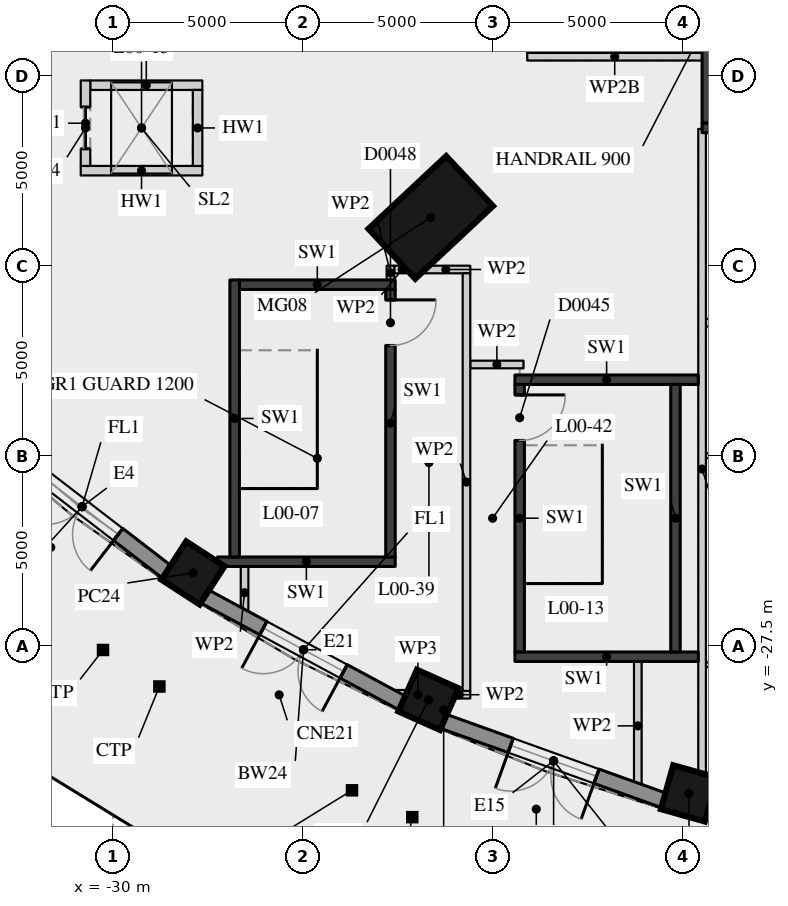
"""IFC4 building model, lengths in metres.
Left out: names, types, materials, properties, quantities, classifications, styles, units other than length and angle.
Written with IfcOpenShell. Run it as: python <this file> out.ifc"""

import sys

from ifc_helpers import new_model, si_unit, direction, frame, frame_2d, origin, origin_2d, place, context, subcontext, project, spatial, rectangle, hollow_circle, extrude, element, fill, save


model = new_model("IFC4")
c1 = context("Model", 3, precision=1e-05, world=origin(), true_north=direction((0.0, 1.0)))
c2 = subcontext(c1, "Body", "Model", "MODEL_VIEW")
j1 = project(units=[si_unit("LENGTHUNIT", "METRE"), si_unit("PLANEANGLEUNIT", "RADIAN")], contexts=[c1])
p1 = place(None, origin())
s1 = spatial("IfcSite", under=j1, at=p1, CompositionType="ELEMENT")
p2 = place(p1, origin())
s2 = spatial("IfcBuilding", under=s1, at=p2, CompositionType="ELEMENT")
p3 = place(p2, origin())
s3 = spatial("IfcBuildingStorey", under=s2, at=p3, CompositionType="ELEMENT", Elevation=0.0)
p4 = place(p3, frame((-21.641, -16.23, 0.0), z_axis=(0.0, 0.0, 1.0), x_axis=(-0.730113022917, -0.683326403535, 0.0)))
e1 = element("IfcColumn", 1, at=p4, inside=s3, PredefinedType="COLUMN", context=c2, shape_type="SweptSolid", body=[
    extrude(rectangle(XDim=2.8, YDim=1.8, at=origin_2d()), origin(), (0.0, 0.0, 1.0), 7.5),
])
for number, where, z_axis, x_axis in (
    (2, (-27.897, -25.586, 0.0), (0.0, 0.0, 1.0), (-0.544, -0.839, 0.0)),
    (3, (-21.7, -28.925, 0.0), (0.0, 0.0, 1.0), (-0.407, -0.913, 0.0)),
    (4, (-14.844, -31.386, 0.0), (0.0, 0.0, 1.0), (-0.271, -0.963, 0.0)),
):
    element("IfcColumn", number, at=place(p3, frame(where, z_axis=z_axis, x_axis=x_axis)), inside=s3, PredefinedType="COLUMN", context=c2, shape_type="SweptSolid", body=[
        extrude(rectangle(XDim=1.2, YDim=1.2, at=origin_2d()), origin(), (0.0, 0.0, 1.0), 7.5),
    ])
p5 = place(p3, frame((-33.063, -22.112, 0.0), z_axis=(0.0, 0.0, 1.0), x_axis=(0.79246558555, -0.609916630138, 0.0)))
e5 = element("IfcWall", 5, at=p5, inside=s3, PredefinedType="SOLIDWALL", context=c2, shape_type="SweptSolid", body=[
    extrude(rectangle(XDim=5.673, YDim=0.4, at=frame_2d((2.837, 0.0))), origin(), (0.0, 0.0, 1.0), 6.19),
])
p6 = place(p5, frame((1.636, 0.0, 0.0)))
e6 = element("IfcOpeningElement", 6, at=p6, cuts=e5, PredefinedType="OPENING", context=c2, shape_type="SweptSolid", body=[
    extrude(rectangle(XDim=2.4, YDim=2.2, at=frame_2d((1.2, 1.1))), frame((0.0, 0.21, 0.0), z_axis=(0.0, -1.0, 0.0), x_axis=(1.0, 0.0, 0.0)), (0.0, 0.0, 1.0), 0.42),
])
p7 = place(p5, frame((1.636, 0.0, 2.6)))
e7 = element("IfcOpeningElement", 7, at=p7, cuts=e5, PredefinedType="OPENING", context=c2, shape_type="SweptSolid", body=[
    extrude(rectangle(XDim=2.4, YDim=3.49, at=frame_2d((1.2, 1.745))), frame((0.0, 0.21, 0.0), z_axis=(0.0, -1.0, 0.0), x_axis=(1.0, 0.0, 0.0)), (0.0, 0.0, 1.0), 0.42),
])
p8 = place(p3, frame((-30.264, -27.612, -0.2), z_axis=(0.0, 0.0, 1.0), x_axis=(1.0, 0.0, 0.0)))
e8 = element("IfcColumn", 8, at=p8, inside=s3, PredefinedType="COLUMN", context=c2, shape_type="SweptSolid", body=[
    extrude(hollow_circle(Radius=0.084, WallThickness=0.008, at=origin_2d()), origin(), (0.0, 0.0, 1.0), 4.755),
])
p9 = place(p3, frame((-27.611, -26.192, 0.0), z_axis=(0.0, 0.0, 1.0), x_axis=(0.880313157301, -0.474393028072, 0.0)))
e9 = element("IfcWall", 9, at=p9, inside=s3, PredefinedType="SOLIDWALL", context=c2, shape_type="SweptSolid", body=[
    extrude(rectangle(XDim=5.958, YDim=0.4, at=frame_2d((2.979, 0.0))), origin(), (0.0, 0.0, 1.0), 6.19),
])
p10 = place(p9, frame((1.779, 0.0, 0.0)))
e10 = element("IfcOpeningElement", 10, at=p10, cuts=e9, PredefinedType="OPENING", context=c2, shape_type="SweptSolid", body=[
    extrude(rectangle(XDim=2.4, YDim=2.2, at=frame_2d((1.2, 1.1))), frame((0.0, 0.21, 0.0), z_axis=(0.0, -1.0, 0.0), x_axis=(1.0, 0.0, 0.0)), (0.0, 0.0, 1.0), 0.42),
])
p11 = place(p9, frame((1.779, 0.0, 2.6)))
e11 = element("IfcOpeningElement", 11, at=p11, cuts=e9, PredefinedType="OPENING", context=c2, shape_type="SweptSolid", body=[
    extrude(rectangle(XDim=2.4, YDim=3.49, at=frame_2d((1.2, 1.745))), frame((0.0, 0.21, 0.0), z_axis=(0.0, -1.0, 0.0), x_axis=(1.0, 0.0, 0.0)), (0.0, 0.0, 1.0), 0.42),
])
for number, where, z_axis, x_axis in (
    (12, (-28.781, -28.573, -0.2), (0.0, 0.0, 1.0), (1.0, 0.0, 0.0)),
    (13, (-23.712, -31.305, -0.2), (0.0, 0.0, 1.0), (1.0, 0.0, 0.0)),
):
    element("IfcColumn", number, at=place(p3, frame(where, z_axis=z_axis, x_axis=x_axis)), inside=s3, PredefinedType="COLUMN", context=c2, shape_type="SweptSolid", body=[
        extrude(hollow_circle(Radius=0.084, WallThickness=0.008, at=origin_2d()), origin(), (0.0, 0.0, 1.0), 4.755),
    ])
p12 = place(p3, frame((-21.325, -29.483, 0.0), z_axis=(0.0, 0.0, 1.0), x_axis=(0.941225814421, -0.337777983694, 0.0)))
e14 = element("IfcWall", 14, at=p12, inside=s3, PredefinedType="SOLIDWALL", context=c2, shape_type="SweptSolid", body=[
    extrude(rectangle(XDim=6.199, YDim=0.4, at=frame_2d((3.1, 0.0))), origin(), (0.0, 0.0, 1.0), 6.19),
])
p13 = place(p12, frame((1.9, 0.0, 0.0)))
e15 = element("IfcOpeningElement", 15, at=p13, cuts=e14, PredefinedType="OPENING", context=c2, shape_type="SweptSolid", body=[
    extrude(rectangle(XDim=2.4, YDim=2.2, at=frame_2d((1.2, 1.1))), frame((0.0, 0.21, 0.0), z_axis=(0.0, -1.0, 0.0), x_axis=(1.0, 0.0, 0.0)), (0.0, 0.0, 1.0), 0.42),
])
p14 = place(p12, frame((1.9, 0.0, 2.6)))
e16 = element("IfcOpeningElement", 16, at=p14, cuts=e14, PredefinedType="OPENING", context=c2, shape_type="SweptSolid", body=[
    extrude(rectangle(XDim=2.4, YDim=3.49, at=frame_2d((1.2, 1.745))), frame((0.0, 0.21, 0.0), z_axis=(0.0, -1.0, 0.0), x_axis=(1.0, 0.0, 0.0)), (0.0, 0.0, 1.0), 0.42),
])
p15 = place(p3, frame((-22.126, -32.012, -0.2), z_axis=(0.0, 0.0, 1.0), x_axis=(1.0, 0.0, 0.0)))
e17 = element("IfcColumn", 17, at=p15, inside=s3, PredefinedType="COLUMN", context=c2, shape_type="SweptSolid", body=[
    extrude(hollow_circle(Radius=0.084, WallThickness=0.008, at=origin_2d()), origin(), (0.0, 0.0, 1.0), 4.755),
])
p16 = place(p3, frame((-14.375, -13.75, 0.0), z_axis=(0.0, 0.0, 1.0), x_axis=(0.0, 1.0, 0.0)))
e18 = element("IfcWall", 18, at=p16, inside=s3, PredefinedType="SHEAR", context=c2, shape_type="SweptSolid", body=[
    extrude(rectangle(XDim=6.0, YDim=0.25, at=frame_2d((3.0, 0.0))), origin(), (0.0, 0.0, 1.0), 7.09),
])
p17 = place(p3, frame((-14.5, -13.875, 0.0), z_axis=(0.0, 0.0, 1.0), x_axis=(1.0, 0.0, 0.0)))
e19 = element("IfcWall", 19, at=p17, inside=s3, PredefinedType="SHEAR", context=c2, shape_type="SweptSolid", body=[
    extrude(rectangle(XDim=5.2, YDim=0.25, at=frame_2d((2.6, 0.0))), origin(), (0.0, 0.0, 1.0), 7.09),
])
p18 = place(p3, frame((-22.78, -28.79, 0.0), z_axis=(0.0, 0.0, 1.0), x_axis=(1.0, 0.0, 0.0)))
e20 = element("IfcWall", 20, at=p18, inside=s3, PredefinedType="PARTITIONING", context=c2, shape_type="SweptSolid", body=[
    extrude(rectangle(XDim=1.605, YDim=0.25, at=frame_2d((0.803, 0.0))), origin(), (0.0, 0.0, 1.0), 7.09),
])
p19 = place(p3, frame((-21.175, -28.79, 0.0), z_axis=(0.0, 0.0, 1.0), x_axis=(1.0, 0.0, 0.0)))
e21 = element("IfcWall", 21, at=p19, inside=s3, PredefinedType="PARTITIONING", context=c2, shape_type="SweptSolid", body=[
    extrude(rectangle(XDim=0.575, YDim=0.2, at=frame_2d((0.288, 0.0))), origin(), (0.0, 0.0, 1.0), 7.09),
])
p20 = place(p3, frame((-14.4, -28.0, 0.0), z_axis=(0.0, 0.0, 1.0), x_axis=(1.0, 0.0, 0.0)))
e22 = element("IfcWall", 22, at=p20, inside=s3, PredefinedType="PARTITIONING", context=c2, shape_type="SweptSolid", body=[
    extrude(rectangle(XDim=2.9, YDim=0.125, at=frame_2d((1.45, 0.0))), origin(), (0.0, 0.0, 1.0), 7.09),
])
p21 = place(p3, frame((-19.425, -27.79, 0.0), z_axis=(0.0, 0.0, 1.0), x_axis=(1.0, 0.0, 0.0)))
e23 = element("IfcWall", 23, at=p21, inside=s3, PredefinedType="SOLIDWALL", context=c2, shape_type="SweptSolid", body=[
    extrude(rectangle(XDim=4.825, YDim=0.25, at=frame_2d((2.413, 0.0))), origin(), (0.0, 0.0, 1.0), 7.09),
])
p22 = place(p3, frame((-27.25, -25.29, 0.0), z_axis=(0.0, 0.0, 1.0), x_axis=(1.0, 0.0, 0.0)))
e24 = element("IfcWall", 24, at=p22, inside=s3, PredefinedType="SOLIDWALL", context=c2, shape_type="SweptSolid", body=[
    extrude(rectangle(XDim=4.676, YDim=0.25, at=frame_2d((2.338, 0.0))), origin(), (0.0, 0.0, 1.0), 7.09),
])
p23 = place(p3, frame((-14.4, -22.5, 0.0), z_axis=(0.0, 0.0, 1.0), x_axis=(1.0, 0.0, 0.0)))
e25 = element("IfcWall", 25, at=p23, inside=s3, PredefinedType="PARTITIONING", context=c2, shape_type="SweptSolid", body=[
    extrude(rectangle(XDim=2.8, YDim=0.125, at=frame_2d((1.4, 0.0))), origin(), (0.0, 0.0, 1.0), 7.09),
])
p24 = place(p3, frame((-19.425, -20.5, 0.0), z_axis=(0.0, 0.0, 1.0), x_axis=(1.0, 0.0, 0.0)))
e26 = element("IfcWall", 26, at=p24, inside=s3, PredefinedType="SOLIDWALL", context=c2, shape_type="SweptSolid", body=[
    extrude(rectangle(XDim=4.825, YDim=0.25, at=frame_2d((2.413, 0.0))), origin(), (0.0, 0.0, 1.0), 7.09),
])
p25 = place(p3, frame((-20.6, -20.1, 0.0), z_axis=(0.0, 0.0, 1.0), x_axis=(1.0, 0.0, 0.0)))
e27 = element("IfcWall", 27, at=p25, inside=s3, PredefinedType="PARTITIONING", context=c2, shape_type="SweptSolid", body=[
    extrude(rectangle(XDim=1.4, YDim=0.2, at=frame_2d((0.7, 0.0))), origin(), (0.0, 0.0, 1.0), 7.09),
])
p26 = place(p3, frame((-14.4, -19.0, 0.0), z_axis=(0.0, 0.0, 1.0), x_axis=(1.0, 0.0, 0.0)))
e28 = element("IfcWall", 28, at=p26, inside=s3, PredefinedType="PARTITIONING", context=c2, shape_type="SweptSolid", body=[
    extrude(rectangle(XDim=5.0, YDim=0.2, at=frame_2d((2.5, 0.0))), origin(), (0.0, 0.0, 1.0), 7.09),
])
p27 = place(p3, frame((-26.675, -18.0, 0.0), z_axis=(0.0, 0.0, 1.0), x_axis=(1.0, 0.0, 0.0)))
e29 = element("IfcWall", 29, at=p27, inside=s3, PredefinedType="SOLIDWALL", context=c2, shape_type="SweptSolid", body=[
    extrude(rectangle(XDim=4.1, YDim=0.25, at=frame_2d((2.05, 0.0))), origin(), (0.0, 0.0, 1.0), 7.09),
])
p28 = place(p3, frame((-22.6, -17.6, 0.0), z_axis=(0.0, 0.0, 1.0), x_axis=(1.0, 0.0, 0.0)))
e30 = element("IfcWall", 30, at=p28, inside=s3, PredefinedType="PARTITIONING", context=c2, shape_type="SweptSolid", body=[
    extrude(rectangle(XDim=0.42, YDim=0.2, at=frame_2d((0.21, 0.0))), origin(), (0.0, 0.0, 1.0), 7.09),
])
p29 = place(p3, frame((-21.887, -17.6, 0.0), z_axis=(0.0, 0.0, 1.0), x_axis=(1.0, 0.0, 0.0)))
e31 = element("IfcWall", 31, at=p29, inside=s3, PredefinedType="PARTITIONING", context=c2, shape_type="SweptSolid", body=[
    extrude(rectangle(XDim=1.287, YDim=0.2, at=frame_2d((0.644, 0.0))), origin(), (0.0, 0.0, 1.0), 7.09),
])
p30 = place(p3, frame((-30.85, -15.0, 0.0), z_axis=(0.0, 0.0, 1.0), x_axis=(1.0, 0.0, 0.0)))
e32 = element("IfcWall", 32, at=p30, inside=s3, PredefinedType="SHEAR", context=c2, shape_type="SweptSolid", body=[
    extrude(rectangle(XDim=3.2, YDim=0.25, at=frame_2d((1.6, 0.0))), origin(), (0.0, 0.0, 1.0), 7.09),
])
p31 = place(p3, frame((-30.6, -12.75, 0.0), z_axis=(0.0, 0.0, 1.0), x_axis=(1.0, 0.0, 0.0)))
e33 = element("IfcWall", 33, at=p31, inside=s3, PredefinedType="SHEAR", context=c2, shape_type="SweptSolid", body=[
    extrude(rectangle(XDim=2.95, YDim=0.25, at=frame_2d((1.475, 0.0))), origin(), (0.0, 0.0, 1.0), 7.09),
])
p32 = place(p3, frame((-19.1, -12.0, 0.0), z_axis=(0.0, 0.0, 1.0), x_axis=(1.0, 0.0, 0.0)))
e34 = element("IfcWall", 34, at=p32, inside=s3, PredefinedType="PARTITIONING", context=c2, shape_type="SweptSolid", body=[
    extrude(rectangle(XDim=4.602, YDim=0.2, at=frame_2d((2.301, 0.0))), origin(), (0.0, 0.0, 1.0), 6.54),
])
p33 = place(p3, frame((-30.725, -14.875, 0.0), z_axis=(0.0, 0.0, 1.0), x_axis=(0.0, 1.0, 0.0)))
e35 = element("IfcWall", 35, at=p33, inside=s3, PredefinedType="SHEAR", context=c2, shape_type="SweptSolid", body=[
    extrude(rectangle(XDim=2.25, YDim=0.25, at=frame_2d((1.125, 0.0))), origin(), (0.0, 0.0, 1.0), 7.09),
])
p34 = place(p33, frame((0.45, 0.0, 0.0)))
e36 = element("IfcOpeningElement", 36, at=p34, cuts=e35, PredefinedType="OPENING", context=c2, shape_type="SweptSolid", body=[
    extrude(rectangle(XDim=1.1, YDim=2.1, at=frame_2d((0.55, 1.05))), frame((0.0, 0.135, 0.0), z_axis=(0.0, -1.0, 0.0), x_axis=(1.0, 0.0, 0.0)), (0.0, 0.0, 1.0), 0.27),
])
p35 = place(p3, frame((-27.775, -14.875, 0.0), z_axis=(0.0, 0.0, 1.0), x_axis=(0.0, 1.0, 0.0)))
e37 = element("IfcWall", 37, at=p35, inside=s3, PredefinedType="SHEAR", context=c2, shape_type="SweptSolid", body=[
    extrude(rectangle(XDim=2.0, YDim=0.25, at=frame_2d((1.0, 0.0))), origin(), (0.0, 0.0, 1.0), 7.09),
])
p36 = place(p3, frame((-26.8, -25.165, 0.0), z_axis=(0.0, 0.0, 1.0), x_axis=(0.0, 1.0, 0.0)))
e38 = element("IfcWall", 38, at=p36, inside=s3, PredefinedType="SOLIDWALL", context=c2, shape_type="SweptSolid", body=[
    extrude(rectangle(XDim=7.29, YDim=0.25, at=frame_2d((3.645, 0.0))), origin(), (0.0, 0.0, 1.0), 7.09),
])
p37 = place(p3, frame((-26.539, -26.796, 0.0), z_axis=(0.0, 0.0, 1.0), x_axis=(0.0, 1.0, 0.0)))
e39 = element("IfcWall", 39, at=p37, inside=s3, PredefinedType="PARTITIONING", context=c2, shape_type="SweptSolid", body=[
    extrude(rectangle(XDim=1.381, YDim=0.2, at=frame_2d((0.69, 0.0))), origin(), (0.0, 0.0, 1.0), 7.09),
])
p38 = place(p3, frame((-22.7, -25.165, 0.0), z_axis=(0.0, 0.0, 1.0), x_axis=(0.0, 1.0, 0.0)))
e40 = element("IfcWall", 40, at=p38, inside=s3, PredefinedType="SOLIDWALL", context=c2, shape_type="SweptSolid", body=[
    extrude(rectangle(XDim=7.04, YDim=0.25, at=frame_2d((3.52, 0.0))), origin(), (0.0, 0.0, 1.0), 7.09),
])
p39 = place(p38, frame((5.565, 0.0, 0.0)))
e41 = element("IfcOpeningElement", 41, at=p39, cuts=e40, PredefinedType="OPENING", context=c2, shape_type="SweptSolid", body=[
    extrude(rectangle(XDim=1.2, YDim=2.1, at=frame_2d((0.6, 1.05))), frame((0.0, 0.135, 0.0), z_axis=(0.0, -1.0, 0.0), x_axis=(1.0, 0.0, 0.0)), (0.0, 0.0, 1.0), 0.27),
])
p40 = place(p3, frame((-22.7, -17.875, 0.0), z_axis=(0.0, 0.0, 1.0), x_axis=(0.0, 1.0, 0.0)))
e42 = element("IfcWall", 42, at=p40, inside=s3, PredefinedType="PARTITIONING", context=c2, shape_type="SweptSolid", body=[
    extrude(rectangle(XDim=0.375, YDim=0.2, at=frame_2d((0.188, 0.0))), origin(), (0.0, 0.0, 1.0), 7.09),
])
p41 = place(p3, frame((-21.3, -29.459, 0.0), z_axis=(0.0, 0.0, 1.0), x_axis=(0.0, 1.0, 0.0)))
e43 = element("IfcWall", 43, at=p41, inside=s3, PredefinedType="PARTITIONING", context=c2, shape_type="SweptSolid", body=[
    extrude(rectangle(XDim=0.544, YDim=0.25, at=frame_2d((0.272, 0.0))), origin(), (0.0, 0.0, 1.0), 7.09),
])
p42 = place(p3, frame((-20.7, -28.69, 0.0), z_axis=(0.0, 0.0, 1.0), x_axis=(0.0, 1.0, 0.0)))
e44 = element("IfcWall", 44, at=p42, inside=s3, PredefinedType="PARTITIONING", context=c2, shape_type="SweptSolid", body=[
    extrude(rectangle(XDim=10.99, YDim=0.2, at=frame_2d((5.495, 0.0))), origin(), (0.0, 0.0, 1.0), 7.09),
])
p43 = place(p3, frame((-19.3, -27.665, 0.0), z_axis=(0.0, 0.0, 1.0), x_axis=(0.0, 1.0, 0.0)))
e45 = element("IfcWall", 45, at=p43, inside=s3, PredefinedType="SOLIDWALL", context=c2, shape_type="SweptSolid", body=[
    extrude(rectangle(XDim=7.04, YDim=0.25, at=frame_2d((3.52, 0.0))), origin(), (0.0, 0.0, 1.0), 7.09),
])
p44 = place(p43, frame((5.565, 0.0, 0.0)))
e46 = element("IfcOpeningElement", 46, at=p44, cuts=e45, PredefinedType="OPENING", context=c2, shape_type="SweptSolid", body=[
    extrude(rectangle(XDim=1.2, YDim=2.1, at=frame_2d((0.6, 1.05))), frame((0.0, 0.135, 0.0), z_axis=(0.0, -1.0, 0.0), x_axis=(1.0, 0.0, 0.0)), (0.0, 0.0, 1.0), 0.27),
])
p45 = place(p3, frame((-19.0, -11.9, 0.0), z_axis=(0.0, 0.0, 1.0), x_axis=(0.0, 1.0, 0.0)))
e47 = element("IfcWall", 47, at=p45, inside=s3, PredefinedType="PARTITIONING", context=c2, shape_type="SweptSolid", body=[
    extrude(rectangle(XDim=6.0, YDim=0.2, at=frame_2d((3.0, 0.0))), origin(), (0.0, 0.0, 1.0), 7.09),
])
p46 = place(p45, frame((2.5, 0.0, 0.0)))
e48 = element("IfcOpeningElement", 48, at=p46, cuts=e47, PredefinedType="OPENING", context=c2, shape_type="SweptSolid", body=[
    extrude(rectangle(XDim=1.0, YDim=2.1, at=frame_2d((0.5, 1.05))), frame((0.0, 0.11, 0.0), z_axis=(0.0, -1.0, 0.0), x_axis=(1.0, 0.0, 0.0)), (0.0, 0.0, 1.0), 0.22),
])
p47 = place(p3, frame((-16.192, -31.304, 0.0), z_axis=(0.0, 0.0, 1.0), x_axis=(0.0, 1.0, 0.0)))
e49 = element("IfcWall", 49, at=p47, inside=s3, PredefinedType="PARTITIONING", context=c2, shape_type="SweptSolid", body=[
    extrude(rectangle(XDim=3.389, YDim=0.2, at=frame_2d((1.695, 0.0))), origin(), (0.0, 0.0, 1.0), 7.09),
])
p48 = place(p3, frame((-15.2, -27.665, 0.0), z_axis=(0.0, 0.0, 1.0), x_axis=(0.0, 1.0, 0.0)))
e50 = element("IfcWall", 50, at=p48, inside=s3, PredefinedType="SOLIDWALL", context=c2, shape_type="SweptSolid", body=[
    extrude(rectangle(XDim=7.04, YDim=0.25, at=frame_2d((3.52, 0.0))), origin(), (0.0, 0.0, 1.0), 7.09),
])
p49 = place(p3, frame((-14.5, -31.803, 0.0), z_axis=(0.0, 0.0, 1.0), x_axis=(0.0, 1.0, 0.0)))
e51 = element("IfcWall", 51, at=p49, inside=s3, PredefinedType="PARTITIONING", context=c2, shape_type="SweptSolid", body=[
    extrude(rectangle(XDim=17.903, YDim=0.2, at=frame_2d((8.952, 0.0))), origin(), (0.0, 0.0, 1.0), 6.64),
])
p50 = place(p6, frame((2.4, 0.0, 0.0), z_axis=(0.0, 0.0, 1.0), x_axis=(-1.0, 0.0, 0.0)))
e52 = element("IfcDoor", 52, at=p50, inside=s3, OperationType="DOUBLE_DOOR_SINGLE_SWING", PredefinedType="DOOR", context=c2, shape_type="SweptSolid", body=[
    extrude(rectangle(XDim=2.4, YDim=2.2, at=frame_2d((1.2, 1.1))), frame((0.0, 0.05, 0.0), z_axis=(0.0, -1.0, 0.0), x_axis=(1.0, 0.0, 0.0)), (0.0, 0.0, 1.0), 0.05),
])
fill(e6, e52)
p51 = place(p7, origin())
e53 = element("IfcWindow", 53, at=p51, inside=s3, PartitioningType="SINGLE_PANEL", PredefinedType="WINDOW", context=c2, shape_type="SweptSolid", body=[
    extrude(rectangle(XDim=2.4, YDim=3.49, at=frame_2d((1.2, 1.745))), frame((0.0, 0.01, 0.0), z_axis=(0.0, -1.0, 0.0), x_axis=(1.0, 0.0, 0.0)), (0.0, 0.0, 1.0), 0.06),
])
fill(e7, e53)
p52 = place(p10, frame((2.4, 0.0, 0.0), z_axis=(0.0, 0.0, 1.0), x_axis=(-1.0, 0.0, 0.0)))
e54 = element("IfcDoor", 54, at=p52, inside=s3, OperationType="DOUBLE_DOOR_SINGLE_SWING", PredefinedType="DOOR", context=c2, shape_type="SweptSolid", body=[
    extrude(rectangle(XDim=2.4, YDim=2.2, at=frame_2d((1.2, 1.1))), frame((0.0, 0.05, 0.0), z_axis=(0.0, -1.0, 0.0), x_axis=(1.0, 0.0, 0.0)), (0.0, 0.0, 1.0), 0.05),
])
fill(e10, e54)
p53 = place(p11, origin())
e55 = element("IfcWindow", 55, at=p53, inside=s3, PartitioningType="SINGLE_PANEL", PredefinedType="WINDOW", context=c2, shape_type="SweptSolid", body=[
    extrude(rectangle(XDim=2.4, YDim=3.49, at=frame_2d((1.2, 1.745))), frame((0.0, 0.01, 0.0), z_axis=(0.0, -1.0, 0.0), x_axis=(1.0, 0.0, 0.0)), (0.0, 0.0, 1.0), 0.06),
])
fill(e11, e55)
p54 = place(p13, frame((2.4, 0.0, 0.0), z_axis=(0.0, 0.0, 1.0), x_axis=(-1.0, 0.0, 0.0)))
e56 = element("IfcDoor", 56, at=p54, inside=s3, OperationType="DOUBLE_DOOR_SINGLE_SWING", PredefinedType="DOOR", context=c2, shape_type="SweptSolid", body=[
    extrude(rectangle(XDim=2.4, YDim=2.2, at=frame_2d((1.2, 1.1))), frame((0.0, 0.05, 0.0), z_axis=(0.0, -1.0, 0.0), x_axis=(1.0, 0.0, 0.0)), (0.0, 0.0, 1.0), 0.05),
])
fill(e15, e56)
p55 = place(p14, origin())
e57 = element("IfcWindow", 57, at=p55, inside=s3, PartitioningType="SINGLE_PANEL", PredefinedType="WINDOW", context=c2, shape_type="SweptSolid", body=[
    extrude(rectangle(XDim=2.4, YDim=3.49, at=frame_2d((1.2, 1.745))), frame((0.0, 0.01, 0.0), z_axis=(0.0, -1.0, 0.0), x_axis=(1.0, 0.0, 0.0)), (0.0, 0.0, 1.0), 0.06),
])
fill(e16, e57)
p56 = place(p34, origin())
e58 = element("IfcDoor", 58, at=p56, inside=s3, OperationType="SLIDING_TO_LEFT", PredefinedType="DOOR", context=c2, shape_type="SweptSolid", body=[
    extrude(rectangle(XDim=1.1, YDim=2.1, at=frame_2d((0.55, 1.05))), frame((0.0, 0.025, 0.0), z_axis=(0.0, -1.0, 0.0), x_axis=(1.0, 0.0, 0.0)), (0.0, 0.0, 1.0), 0.05),
])
fill(e36, e58)
p57 = place(p39, origin())
e59 = element("IfcDoor", 59, at=p57, inside=s3, OperationType="SINGLE_SWING_LEFT", PredefinedType="DOOR", context=c2, shape_type="SweptSolid", body=[
    extrude(rectangle(XDim=1.2, YDim=2.1, at=frame_2d((0.6, 1.05))), frame((0.0, 0.025, 0.0), z_axis=(0.0, -1.0, 0.0), x_axis=(1.0, 0.0, 0.0)), (0.0, 0.0, 1.0), 0.05),
])
fill(e41, e59)
p58 = place(p44, origin())
e60 = element("IfcDoor", 60, at=p58, inside=s3, OperationType="SINGLE_SWING_LEFT", PredefinedType="DOOR", context=c2, shape_type="SweptSolid", body=[
    extrude(rectangle(XDim=1.2, YDim=2.1, at=frame_2d((0.6, 1.05))), frame((0.0, 0.025, 0.0), z_axis=(0.0, -1.0, 0.0), x_axis=(1.0, 0.0, 0.0)), (0.0, 0.0, 1.0), 0.05),
])
fill(e46, e60)
save(model, sys.argv[1])
